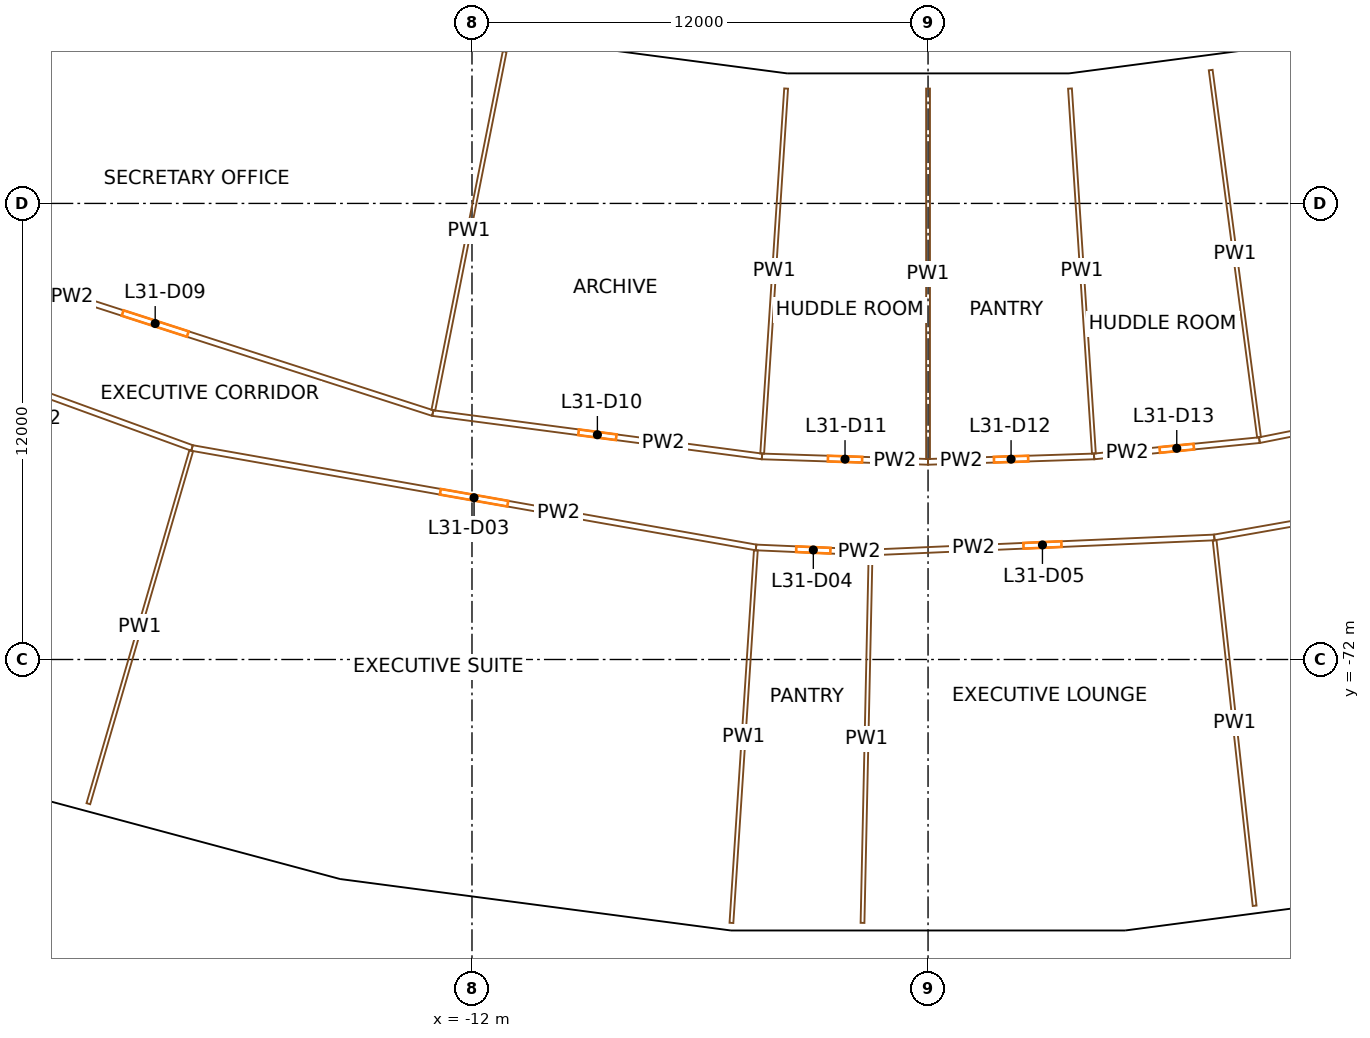
"""IFC4 building model, lengths in metres.
Left out: names, types, materials, properties, quantities, classifications, styles, units other than length and angle.
Written with IfcOpenShell. Run it as: python <this file> out.ifc"""

import sys

from ifc_helpers import new_model, si_unit, direction, frame, frame_2d, origin, origin_2d, place, context, subcontext, project, spatial, rectangle, extrude, element, fill, save


model = new_model("IFC4")
c1 = context("Model", 3, precision=1e-05, world=origin(), true_north=direction((0.0, 1.0)))
c2 = subcontext(c1, "Body", "Model", "MODEL_VIEW")
j1 = project(units=[si_unit("LENGTHUNIT", "METRE"), si_unit("PLANEANGLEUNIT", "RADIAN")], contexts=[c1])
p1 = place(None, origin())
s1 = spatial("IfcSite", under=j1, at=p1, CompositionType="ELEMENT")
p2 = place(p1, origin())
s2 = spatial("IfcBuilding", under=s1, at=p2, CompositionType="ELEMENT")
p3 = place(p2, frame((0.0, 0.0, 136.7)))
s3 = spatial("IfcBuildingStorey", under=s2, at=p3, CompositionType="ELEMENT", Elevation=136.7)
for number, where, z_axis, x_axis in (
    (1, (-18.724, -55.159, 0.0), (0.0, 0.0, 1.0), (0.947, -0.321, 0.0)),
    (2, (-11.364, -57.131, 0.0), (0.0, 0.0, 1.0), (0.981, -0.195, 0.0)),
    (3, (-15.168, -76.256, 0.0), (0.0, 0.0, 1.0), (0.981, -0.195, 0.0)),
    (4, (-3.81, -58.125, 0.0), (0.0, 0.0, 1.0), (0.998, -0.065, 0.0)),
    (5, (-5.085, -77.583, 0.0), (0.0, 0.0, 1.0), (0.998, -0.065, 0.0)),
    (6, (3.81, -58.125, 0.0), (0.0, 0.0, 1.0), (0.998, 0.065, 0.0)),
    (7, (5.085, -77.583, 0.0), (0.0, 0.0, 1.0), (0.998, 0.065, 0.0)),
):
    element("IfcColumn", number, at=place(p3, frame(where, z_axis=z_axis, x_axis=x_axis)), inside=s3, PredefinedType="COLUMN", context=c2, shape_type="SweptSolid", body=[
        extrude(rectangle(XDim=1.2, YDim=1.5, at=origin_2d()), origin(), (0.0, 0.0, 1.0), 3.8),
    ])
p4 = place(p3, frame((11.125, -55.804, 0.0), z_axis=(0.0, 0.0, 1.0), x_axis=(-0.991444533306, -0.130528684121, 0.0)))
e8 = element("IfcWall", 8, at=p4, inside=s3, PredefinedType="SOLIDWALL", context=c2, shape_type="SweptSolid", body=[
    extrude(rectangle(XDim=7.493, YDim=0.4, at=frame_2d((3.747, 0.0))), origin(), (0.0, 0.0, 1.0), 2.7),
])
p5 = place(p4, frame((4.301, 0.0, 0.9)))
e9 = element("IfcOpeningElement", 9, at=p5, cuts=e8, PredefinedType="OPENING", context=c2, shape_type="SweptSolid", body=[
    extrude(rectangle(XDim=2.6, YDim=1.65, at=frame_2d((1.3, 0.825))), frame((0.0, 0.21, 0.0), z_axis=(0.0, -1.0, 0.0), x_axis=(1.0, 0.0, 0.0)), (0.0, 0.0, 1.0), 0.42),
])
p6 = place(p4, frame((0.592, 0.0, 0.9)))
e10 = element("IfcOpeningElement", 10, at=p6, cuts=e8, PredefinedType="OPENING", context=c2, shape_type="SweptSolid", body=[
    extrude(rectangle(XDim=2.6, YDim=1.65, at=frame_2d((1.3, 0.825))), frame((0.0, 0.21, 0.0), z_axis=(0.0, -1.0, 0.0), x_axis=(1.0, 0.0, 0.0)), (0.0, 0.0, 1.0), 0.42),
])
p7 = place(p3, frame((-3.697, -56.782, 0.0), z_axis=(0.0, 0.0, 1.0), x_axis=(-0.991444533306, 0.130528684121, 0.0)))
e11 = element("IfcWall", 11, at=p7, inside=s3, PredefinedType="SOLIDWALL", context=c2, shape_type="SweptSolid", body=[
    extrude(rectangle(XDim=7.493, YDim=0.4, at=frame_2d((3.747, 0.0))), origin(), (0.0, 0.0, 1.0), 2.7),
])
p8 = place(p7, frame((4.301, 0.0, 0.9)))
e12 = element("IfcOpeningElement", 12, at=p8, cuts=e11, PredefinedType="OPENING", context=c2, shape_type="SweptSolid", body=[
    extrude(rectangle(XDim=2.6, YDim=1.65, at=frame_2d((1.3, 0.825))), frame((0.0, 0.21, 0.0), z_axis=(0.0, -1.0, 0.0), x_axis=(1.0, 0.0, 0.0)), (0.0, 0.0, 1.0), 0.42),
])
p9 = place(p7, frame((0.592, 0.0, 0.9)))
e13 = element("IfcOpeningElement", 13, at=p9, cuts=e11, PredefinedType="OPENING", context=c2, shape_type="SweptSolid", body=[
    extrude(rectangle(XDim=2.6, YDim=1.65, at=frame_2d((1.3, 0.825))), frame((0.0, 0.21, 0.0), z_axis=(0.0, -1.0, 0.0), x_axis=(1.0, 0.0, 0.0)), (0.0, 0.0, 1.0), 0.42),
])
p10 = place(p3, frame((3.671, -56.779, 0.0), z_axis=(0.0, 0.0, 1.0), x_axis=(-1.0, 0.0, 0.0)))
e14 = element("IfcWall", 14, at=p10, inside=s3, PredefinedType="SOLIDWALL", context=c2, shape_type="SweptSolid", body=[
    extrude(rectangle(XDim=7.341, YDim=0.4, at=frame_2d((3.671, 0.0))), origin(), (0.0, 0.0, 1.0), 2.7),
])
p11 = place(p10, frame((4.225, 0.0, 0.9)))
e15 = element("IfcOpeningElement", 15, at=p11, cuts=e14, PredefinedType="OPENING", context=c2, shape_type="SweptSolid", body=[
    extrude(rectangle(XDim=2.6, YDim=1.65, at=frame_2d((1.3, 0.825))), frame((0.0, 0.21, 0.0), z_axis=(0.0, -1.0, 0.0), x_axis=(1.0, 0.0, 0.0)), (0.0, 0.0, 1.0), 0.42),
])
p12 = place(p10, frame((0.517, 0.0, 0.9)))
e16 = element("IfcOpeningElement", 16, at=p12, cuts=e14, PredefinedType="OPENING", context=c2, shape_type="SweptSolid", body=[
    extrude(rectangle(XDim=2.6, YDim=1.65, at=frame_2d((1.3, 0.825))), frame((0.0, 0.21, 0.0), z_axis=(0.0, -1.0, 0.0), x_axis=(1.0, 0.0, 0.0)), (0.0, 0.0, 1.0), 0.42),
])
p13 = place(p3, frame((-19.366, -66.435, 0.0), z_axis=(0.0, 0.0, 1.0), x_axis=(-0.939690219257, 0.342026741401, 0.0)))
e17 = element("IfcWall", 17, at=p13, inside=s3, PredefinedType="PARTITIONING", context=c2, shape_type="SweptSolid", body=[
    extrude(rectangle(XDim=9.052, YDim=0.15, at=frame_2d((4.526, 0.0))), origin(), (0.0, 0.0, 1.0), 2.4),
])
p14 = place(p13, frame((4.026, 0.0, 0.0)))
e18 = element("IfcOpeningElement", 18, at=p14, cuts=e17, PredefinedType="OPENING", context=c2, shape_type="SweptSolid", body=[
    extrude(rectangle(XDim=1.0, YDim=2.1, at=frame_2d((0.5, 1.05))), frame((0.0, 0.085, 0.0), z_axis=(0.0, -1.0, 0.0), x_axis=(1.0, 0.0, 0.0)), (0.0, 0.0, 1.0), 0.17),
])
p15 = place(p3, frame((-27.639, -60.804, 0.0), z_axis=(0.0, 0.0, 1.0), x_axis=(0.951705469381, -0.307012539729, 0.0)))
e19 = element("IfcWall", 19, at=p15, inside=s3, PredefinedType="PARTITIONING", context=c2, shape_type="SweptSolid", body=[
    extrude(rectangle(XDim=15.348, YDim=0.15, at=frame_2d((7.674, 0.0))), origin(), (0.0, 0.0, 1.0), 2.4),
])
p16 = place(p15, frame((6.774, 0.0, 0.0)))
e20 = element("IfcOpeningElement", 20, at=p16, cuts=e19, PredefinedType="OPENING", context=c2, shape_type="SweptSolid", body=[
    extrude(rectangle(XDim=1.8, YDim=2.1, at=frame_2d((0.9, 1.05))), frame((0.0, 0.085, 0.0), z_axis=(0.0, -1.0, 0.0), x_axis=(1.0, 0.0, 0.0)), (0.0, 0.0, 1.0), 0.17),
])
p17 = place(p3, frame((-22.094, -75.794, 0.0), z_axis=(0.0, 0.0, 1.0), x_axis=(0.279846881911, 0.960044646194, 0.0)))
e21 = element("IfcWall", 21, at=p17, inside=s3, PredefinedType="PARTITIONING", context=c2, shape_type="SweptSolid", body=[
    extrude(rectangle(XDim=9.674, YDim=0.1, at=frame_2d((4.837, 0.0))), origin(), (0.0, 0.0, 1.0), 2.4),
])
p18 = place(p3, frame((-21.884, -52.598, 0.0), z_axis=(0.0, 0.0, 1.0), x_axis=(-0.580016763963, -0.814604538118, 0.0)))
e22 = element("IfcWall", 22, at=p18, inside=s3, PredefinedType="PARTITIONING", context=c2, shape_type="SweptSolid", body=[
    extrude(rectangle(XDim=10.121, YDim=0.15, at=frame_2d((5.061, 0.0))), origin(), (0.0, 0.0, 1.0), 2.4),
])
p19 = place(p3, frame((-4.526, -69.052, 0.0), z_axis=(0.0, 0.0, 1.0), x_axis=(-0.984805080703, 0.173663332402, 0.0)))
e23 = element("IfcWall", 23, at=p19, inside=s3, PredefinedType="PARTITIONING", context=c2, shape_type="SweptSolid", body=[
    extrude(rectangle(XDim=15.069, YDim=0.15, at=frame_2d((7.535, 0.0))), origin(), (0.0, 0.0, 1.0), 2.4),
])
p20 = place(p19, frame((6.635, 0.0, 0.0)))
e24 = element("IfcOpeningElement", 24, at=p20, cuts=e23, PredefinedType="OPENING", context=c2, shape_type="SweptSolid", body=[
    extrude(rectangle(XDim=1.8, YDim=2.1, at=frame_2d((0.9, 1.05))), frame((0.0, 0.085, 0.0), z_axis=(0.0, -1.0, 0.0), x_axis=(1.0, 0.0, 0.0)), (0.0, 0.0, 1.0), 0.17),
])
p21 = place(p3, frame((-13.032, -65.516, 0.0), z_axis=(0.0, 0.0, 1.0), x_axis=(0.991443260322, -0.130538352841, 0.0)))
e25 = element("IfcWall", 25, at=p21, inside=s3, PredefinedType="PARTITIONING", context=c2, shape_type="SweptSolid", body=[
    extrude(rectangle(XDim=8.738, YDim=0.15, at=frame_2d((4.369, 0.0))), origin(), (0.0, 0.0, 1.0), 2.4),
])
p22 = place(p21, frame((3.869, 0.0, 0.0)))
e26 = element("IfcOpeningElement", 26, at=p22, cuts=e25, PredefinedType="OPENING", context=c2, shape_type="SweptSolid", body=[
    extrude(rectangle(XDim=1.0, YDim=2.1, at=frame_2d((0.5, 1.05))), frame((0.0, 0.085, 0.0), z_axis=(0.0, -1.0, 0.0), x_axis=(1.0, 0.0, 0.0)), (0.0, 0.0, 1.0), 0.17),
])
p23 = place(p3, frame((-11.14, -56.003, 0.0), z_axis=(0.0, 0.0, 1.0), x_axis=(-0.195086769421, -0.980785987052, 0.0)))
e27 = element("IfcWall", 27, at=p23, inside=s3, PredefinedType="PARTITIONING", context=c2, shape_type="SweptSolid", body=[
    extrude(rectangle(XDim=9.625, YDim=0.1, at=frame_2d((4.812, 0.0))), origin(), (0.0, 0.0, 1.0), 2.4),
])
p24 = place(p3, frame((-5.173, -78.931, 0.0), z_axis=(0.0, 0.0, 1.0), x_axis=(0.065402415744, 0.997858970003, 0.0)))
e28 = element("IfcWall", 28, at=p24, inside=s3, PredefinedType="PARTITIONING", context=c2, shape_type="SweptSolid", body=[
    extrude(rectangle(XDim=9.825, YDim=0.1, at=frame_2d((4.913, 0.0))), origin(), (0.0, 0.0, 1.0), 2.4),
])
p25 = place(p3, frame((-1.511, -69.184, 0.0), z_axis=(0.0, 0.0, 1.0), x_axis=(-0.999044980715, 0.043693552246, 0.0)))
e29 = element("IfcWall", 29, at=p25, inside=s3, PredefinedType="PARTITIONING", context=c2, shape_type="SweptSolid", body=[
    extrude(rectangle(XDim=3.017, YDim=0.15, at=frame_2d((1.509, 0.0))), origin(), (0.0, 0.0, 1.0), 2.4),
])
p26 = place(p25, frame((1.059, 0.0, 0.0)))
e30 = element("IfcOpeningElement", 30, at=p26, cuts=e29, PredefinedType="OPENING", context=c2, shape_type="SweptSolid", body=[
    extrude(rectangle(XDim=0.9, YDim=2.1, at=frame_2d((0.45, 1.05))), frame((0.0, 0.085, 0.0), z_axis=(0.0, -1.0, 0.0), x_axis=(1.0, 0.0, 0.0)), (0.0, 0.0, 1.0), 0.17),
])
p27 = place(p3, frame((-4.369, -66.657, 0.0), z_axis=(0.0, 0.0, 1.0), x_axis=(0.99946426167, -0.03272903366, 0.0)))
e31 = element("IfcWall", 31, at=p27, inside=s3, PredefinedType="PARTITIONING", context=c2, shape_type="SweptSolid", body=[
    extrude(rectangle(XDim=4.371, YDim=0.15, at=frame_2d((2.186, 0.0))), origin(), (0.0, 0.0, 1.0), 2.4),
])
p28 = place(p27, frame((1.736, 0.0, 0.0)))
e32 = element("IfcOpeningElement", 32, at=p28, cuts=e31, PredefinedType="OPENING", context=c2, shape_type="SweptSolid", body=[
    extrude(rectangle(XDim=0.9, YDim=2.1, at=frame_2d((0.45, 1.05))), frame((0.0, 0.085, 0.0), z_axis=(0.0, -1.0, 0.0), x_axis=(1.0, 0.0, 0.0)), (0.0, 0.0, 1.0), 0.17),
])
p29 = place(p3, frame((-3.735, -56.978, 0.0), z_axis=(0.0, 0.0, 1.0), x_axis=(-0.065392665599, -0.997859609006, 0.0)))
e33 = element("IfcWall", 33, at=p29, inside=s3, PredefinedType="PARTITIONING", context=c2, shape_type="SweptSolid", body=[
    extrude(rectangle(XDim=9.625, YDim=0.1, at=frame_2d((4.812, 0.0))), origin(), (0.0, 0.0, 1.0), 2.4),
])
p30 = place(p3, frame((-1.724, -78.93, 0.0), z_axis=(0.0, 0.0, 1.0), x_axis=(0.021829960086, 0.999761698027, 0.0)))
e34 = element("IfcWall", 34, at=p30, inside=s3, PredefinedType="PARTITIONING", context=c2, shape_type="SweptSolid", body=[
    extrude(rectangle(XDim=9.674, YDim=0.1, at=frame_2d((4.837, 0.0))), origin(), (0.0, 0.0, 1.0), 2.4),
])
p31 = place(p3, frame((7.532, -68.789, 0.0), z_axis=(0.0, 0.0, 1.0), x_axis=(-0.999048509506, -0.043612792308, 0.0)))
e35 = element("IfcWall", 35, at=p31, inside=s3, PredefinedType="PARTITIONING", context=c2, shape_type="SweptSolid", body=[
    extrude(rectangle(XDim=9.052, YDim=0.15, at=frame_2d((4.526, 0.0))), origin(), (0.0, 0.0, 1.0), 2.4),
])
p32 = place(p31, frame((4.026, 0.0, 0.0)))
e36 = element("IfcOpeningElement", 36, at=p32, cuts=e35, PredefinedType="OPENING", context=c2, shape_type="SweptSolid", body=[
    extrude(rectangle(XDim=1.0, YDim=2.1, at=frame_2d((0.5, 1.05))), frame((0.0, 0.085, 0.0), z_axis=(0.0, -1.0, 0.0), x_axis=(1.0, 0.0, 0.0)), (0.0, 0.0, 1.0), 0.17),
])
p33 = place(p3, frame((0.0, -66.8, 0.0), z_axis=(0.0, 0.0, 1.0), x_axis=(0.99946426167, 0.03272903366, 0.0)))
e37 = element("IfcWall", 37, at=p33, inside=s3, PredefinedType="PARTITIONING", context=c2, shape_type="SweptSolid", body=[
    extrude(rectangle(XDim=4.371, YDim=0.15, at=frame_2d((2.186, 0.0))), origin(), (0.0, 0.0, 1.0), 2.4),
])
p34 = place(p33, frame((1.736, 0.0, 0.0)))
e38 = element("IfcOpeningElement", 38, at=p34, cuts=e37, PredefinedType="OPENING", context=c2, shape_type="SweptSolid", body=[
    extrude(rectangle(XDim=0.9, YDim=2.1, at=frame_2d((0.45, 1.05))), frame((0.0, 0.085, 0.0), z_axis=(0.0, -1.0, 0.0), x_axis=(1.0, 0.0, 0.0)), (0.0, 0.0, 1.0), 0.17),
])
p35 = place(p3, frame((0.0, -56.979, 0.0), z_axis=(0.0, 0.0, 1.0), x_axis=(0.0, -1.0, 0.0)))
e39 = element("IfcWall", 39, at=p35, inside=s3, PredefinedType="PARTITIONING", context=c2, shape_type="SweptSolid", body=[
    extrude(rectangle(XDim=9.747, YDim=0.1, at=frame_2d((4.873, 0.0))), origin(), (0.0, 0.0, 1.0), 2.4),
])
p36 = place(p3, frame((3.735, -56.978, 0.0), z_axis=(0.0, 0.0, 1.0), x_axis=(0.065392665599, -0.997859609006, 0.0)))
e40 = element("IfcWall", 40, at=p36, inside=s3, PredefinedType="PARTITIONING", context=c2, shape_type="SweptSolid", body=[
    extrude(rectangle(XDim=9.625, YDim=0.1, at=frame_2d((4.812, 0.0))), origin(), (0.0, 0.0, 1.0), 2.4),
])
p37 = place(p3, frame((4.369, -66.657, 0.0), z_axis=(0.0, 0.0, 1.0), x_axis=(0.995184826457, 0.098016127192, 0.0)))
e41 = element("IfcWall", 41, at=p37, inside=s3, PredefinedType="PARTITIONING", context=c2, shape_type="SweptSolid", body=[
    extrude(rectangle(XDim=4.371, YDim=0.15, at=frame_2d((2.186, 0.0))), origin(), (0.0, 0.0, 1.0), 2.4),
])
p38 = place(p37, frame((1.736, 0.0, 0.0)))
e42 = element("IfcOpeningElement", 42, at=p38, cuts=e41, PredefinedType="OPENING", context=c2, shape_type="SweptSolid", body=[
    extrude(rectangle(XDim=0.9, YDim=2.1, at=frame_2d((0.45, 1.05))), frame((0.0, 0.085, 0.0), z_axis=(0.0, -1.0, 0.0), x_axis=(1.0, 0.0, 0.0)), (0.0, 0.0, 1.0), 0.17),
])
p39 = place(p3, frame((7.437, -56.491, 0.0), z_axis=(0.0, 0.0, 1.0), x_axis=(0.13053421433, -0.99144380521, 0.0)))
e43 = element("IfcWall", 43, at=p39, inside=s3, PredefinedType="PARTITIONING", context=c2, shape_type="SweptSolid", body=[
    extrude(rectangle(XDim=9.746, YDim=0.1, at=frame_2d((4.873, 0.0))), origin(), (0.0, 0.0, 1.0), 2.4),
])
p40 = place(p3, frame((16.446, -67.217, 0.0), z_axis=(0.0, 0.0, 1.0), x_axis=(-0.984813412134, -0.173616080133, 0.0)))
e44 = element("IfcWall", 44, at=p40, inside=s3, PredefinedType="PARTITIONING", context=c2, shape_type="SweptSolid", body=[
    extrude(rectangle(XDim=9.052, YDim=0.15, at=frame_2d((4.526, 0.0))), origin(), (0.0, 0.0, 1.0), 2.4),
])
p41 = place(p40, frame((4.026, 0.0, 0.0)))
e45 = element("IfcOpeningElement", 45, at=p41, cuts=e44, PredefinedType="OPENING", context=c2, shape_type="SweptSolid", body=[
    extrude(rectangle(XDim=1.0, YDim=2.1, at=frame_2d((0.5, 1.05))), frame((0.0, 0.085, 0.0), z_axis=(0.0, -1.0, 0.0), x_axis=(1.0, 0.0, 0.0)), (0.0, 0.0, 1.0), 0.17),
])
p42 = place(p3, frame((8.593, -78.48, 0.0), z_axis=(0.0, 0.0, 1.0), x_axis=(-0.10884699726, 0.994058514972, 0.0)))
e46 = element("IfcWall", 46, at=p42, inside=s3, PredefinedType="PARTITIONING", context=c2, shape_type="SweptSolid", body=[
    extrude(rectangle(XDim=9.674, YDim=0.1, at=frame_2d((4.837, 0.0))), origin(), (0.0, 0.0, 1.0), 2.4),
])
p43 = place(p3, frame((8.719, -66.229, 0.0), z_axis=(0.0, 0.0, 1.0), x_axis=(0.980786466832, 0.195084357342, 0.0)))
e47 = element("IfcWall", 47, at=p43, inside=s3, PredefinedType="PARTITIONING", context=c2, shape_type="SweptSolid", body=[
    extrude(rectangle(XDim=8.738, YDim=0.15, at=frame_2d((4.369, 0.0))), origin(), (0.0, 0.0, 1.0), 2.4),
])
p44 = place(p43, frame((3.869, 0.0, 0.0)))
e48 = element("IfcOpeningElement", 48, at=p44, cuts=e47, PredefinedType="OPENING", context=c2, shape_type="SweptSolid", body=[
    extrude(rectangle(XDim=1.0, YDim=2.1, at=frame_2d((0.5, 1.05))), frame((0.0, 0.085, 0.0), z_axis=(0.0, -1.0, 0.0), x_axis=(1.0, 0.0, 0.0)), (0.0, 0.0, 1.0), 0.17),
])
p45 = place(p8, origin())
e49 = element("IfcWindow", 49, at=p45, inside=s3, PartitioningType="SINGLE_PANEL", PredefinedType="WINDOW", context=c2, shape_type="SweptSolid", body=[
    extrude(rectangle(XDim=2.6, YDim=1.65, at=frame_2d((1.3, 0.825))), frame((0.0, 0.03, 0.0), z_axis=(0.0, -1.0, 0.0), x_axis=(1.0, 0.0, 0.0)), (0.0, 0.0, 1.0), 0.06),
])
fill(e12, e49)
p46 = place(p9, origin())
e50 = element("IfcWindow", 50, at=p46, inside=s3, PartitioningType="SINGLE_PANEL", PredefinedType="WINDOW", context=c2, shape_type="SweptSolid", body=[
    extrude(rectangle(XDim=2.6, YDim=1.65, at=frame_2d((1.3, 0.825))), frame((0.0, 0.03, 0.0), z_axis=(0.0, -1.0, 0.0), x_axis=(1.0, 0.0, 0.0)), (0.0, 0.0, 1.0), 0.06),
])
fill(e13, e50)
p47 = place(p11, origin())
e51 = element("IfcWindow", 51, at=p47, inside=s3, PartitioningType="SINGLE_PANEL", PredefinedType="WINDOW", context=c2, shape_type="SweptSolid", body=[
    extrude(rectangle(XDim=2.6, YDim=1.65, at=frame_2d((1.3, 0.825))), frame((0.0, 0.03, 0.0), z_axis=(0.0, -1.0, 0.0), x_axis=(1.0, 0.0, 0.0)), (0.0, 0.0, 1.0), 0.06),
])
fill(e15, e51)
p48 = place(p12, origin())
e52 = element("IfcWindow", 52, at=p48, inside=s3, PartitioningType="SINGLE_PANEL", PredefinedType="WINDOW", context=c2, shape_type="SweptSolid", body=[
    extrude(rectangle(XDim=2.6, YDim=1.65, at=frame_2d((1.3, 0.825))), frame((0.0, 0.03, 0.0), z_axis=(0.0, -1.0, 0.0), x_axis=(1.0, 0.0, 0.0)), (0.0, 0.0, 1.0), 0.06),
])
fill(e16, e52)
p49 = place(p5, origin())
e53 = element("IfcWindow", 53, at=p49, inside=s3, PartitioningType="SINGLE_PANEL", PredefinedType="WINDOW", context=c2, shape_type="SweptSolid", body=[
    extrude(rectangle(XDim=2.6, YDim=1.65, at=frame_2d((1.3, 0.825))), frame((0.0, 0.03, 0.0), z_axis=(0.0, -1.0, 0.0), x_axis=(1.0, 0.0, 0.0)), (0.0, 0.0, 1.0), 0.06),
])
fill(e9, e53)
p50 = place(p6, origin())
e54 = element("IfcWindow", 54, at=p50, inside=s3, PartitioningType="SINGLE_PANEL", PredefinedType="WINDOW", context=c2, shape_type="SweptSolid", body=[
    extrude(rectangle(XDim=2.6, YDim=1.65, at=frame_2d((1.3, 0.825))), frame((0.0, 0.03, 0.0), z_axis=(0.0, -1.0, 0.0), x_axis=(1.0, 0.0, 0.0)), (0.0, 0.0, 1.0), 0.06),
])
fill(e10, e54)
p51 = place(p20, origin())
e55 = element("IfcDoor", 55, at=p51, inside=s3, OperationType="DOUBLE_DOOR_SINGLE_SWING", PredefinedType="DOOR", context=c2, shape_type="SweptSolid", body=[
    extrude(rectangle(XDim=1.8, YDim=2.1, at=frame_2d((0.9, 1.05))), frame((0.0, 0.025, 0.0), z_axis=(0.0, -1.0, 0.0), x_axis=(1.0, 0.0, 0.0)), (0.0, 0.0, 1.0), 0.05),
])
fill(e24, e55)
p52 = place(p26, origin())
e56 = element("IfcDoor", 56, at=p52, inside=s3, OperationType="SINGLE_SWING_RIGHT", PredefinedType="DOOR", context=c2, shape_type="SweptSolid", body=[
    extrude(rectangle(XDim=0.9, YDim=2.1, at=frame_2d((0.45, 1.05))), frame((0.0, 0.025, 0.0), z_axis=(0.0, -1.0, 0.0), x_axis=(1.0, 0.0, 0.0)), (0.0, 0.0, 1.0), 0.05),
])
fill(e30, e56)
p53 = place(p32, origin())
e57 = element("IfcDoor", 57, at=p53, inside=s3, OperationType="SINGLE_SWING_RIGHT", PredefinedType="DOOR", context=c2, shape_type="SweptSolid", body=[
    extrude(rectangle(XDim=1.0, YDim=2.1, at=frame_2d((0.5, 1.05))), frame((0.0, 0.025, 0.0), z_axis=(0.0, -1.0, 0.0), x_axis=(1.0, 0.0, 0.0)), (0.0, 0.0, 1.0), 0.05),
])
fill(e36, e57)
p54 = place(p16, origin())
e58 = element("IfcDoor", 58, at=p54, inside=s3, OperationType="DOUBLE_DOOR_SINGLE_SWING", PredefinedType="DOOR", context=c2, shape_type="SweptSolid", body=[
    extrude(rectangle(XDim=1.8, YDim=2.1, at=frame_2d((0.9, 1.05))), frame((0.0, 0.025, 0.0), z_axis=(0.0, -1.0, 0.0), x_axis=(1.0, 0.0, 0.0)), (0.0, 0.0, 1.0), 0.05),
])
fill(e20, e58)
p55 = place(p22, origin())
e59 = element("IfcDoor", 59, at=p55, inside=s3, OperationType="SINGLE_SWING_RIGHT", PredefinedType="DOOR", context=c2, shape_type="SweptSolid", body=[
    extrude(rectangle(XDim=1.0, YDim=2.1, at=frame_2d((0.5, 1.05))), frame((0.0, 0.025, 0.0), z_axis=(0.0, -1.0, 0.0), x_axis=(1.0, 0.0, 0.0)), (0.0, 0.0, 1.0), 0.05),
])
fill(e26, e59)
p56 = place(p28, origin())
e60 = element("IfcDoor", 60, at=p56, inside=s3, OperationType="SINGLE_SWING_RIGHT", PredefinedType="DOOR", context=c2, shape_type="SweptSolid", body=[
    extrude(rectangle(XDim=0.9, YDim=2.1, at=frame_2d((0.45, 1.05))), frame((0.0, 0.025, 0.0), z_axis=(0.0, -1.0, 0.0), x_axis=(1.0, 0.0, 0.0)), (0.0, 0.0, 1.0), 0.05),
])
fill(e32, e60)
p57 = place(p34, origin())
e61 = element("IfcDoor", 61, at=p57, inside=s3, OperationType="SINGLE_SWING_RIGHT", PredefinedType="DOOR", context=c2, shape_type="SweptSolid", body=[
    extrude(rectangle(XDim=0.9, YDim=2.1, at=frame_2d((0.45, 1.05))), frame((0.0, 0.025, 0.0), z_axis=(0.0, -1.0, 0.0), x_axis=(1.0, 0.0, 0.0)), (0.0, 0.0, 1.0), 0.05),
])
fill(e38, e61)
p58 = place(p38, origin())
e62 = element("IfcDoor", 62, at=p58, inside=s3, OperationType="SINGLE_SWING_RIGHT", PredefinedType="DOOR", context=c2, shape_type="SweptSolid", body=[
    extrude(rectangle(XDim=0.9, YDim=2.1, at=frame_2d((0.45, 1.05))), frame((0.0, 0.025, 0.0), z_axis=(0.0, -1.0, 0.0), x_axis=(1.0, 0.0, 0.0)), (0.0, 0.0, 1.0), 0.05),
])
fill(e42, e62)
save(model, sys.argv[1])
